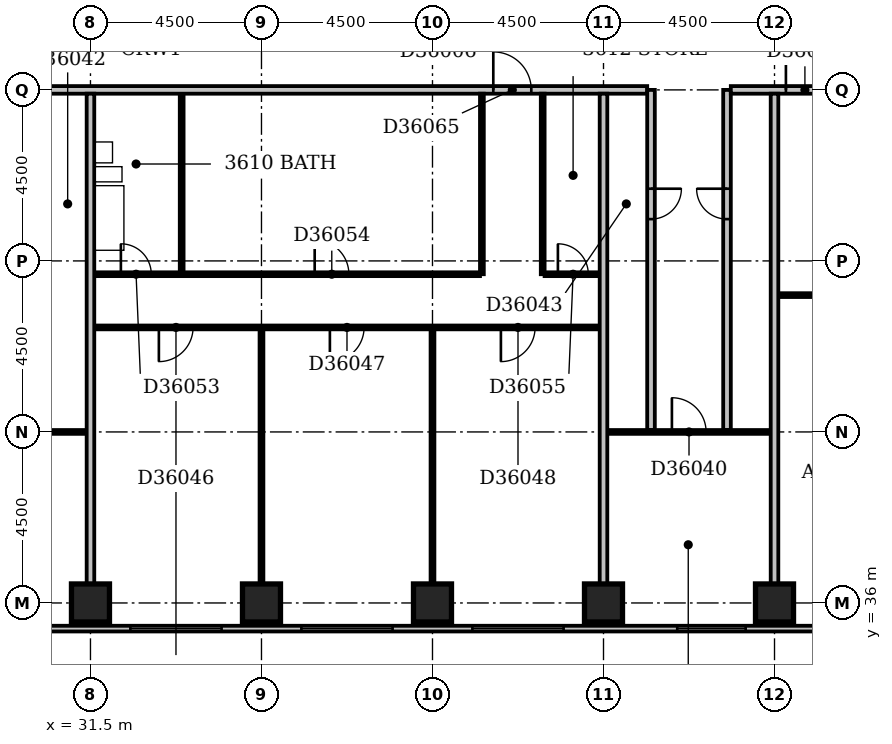
"""IFC4 building model, lengths in metres.
Left out: names, types, materials, properties, quantities, classifications, styles, units other than length and angle.
Written with IfcOpenShell. Run it as: python <this file> out.ifc"""

import sys

from ifc_helpers import new_model, si_unit, direction, frame, frame_2d, origin, origin_2d, place, context, subcontext, project, spatial, rectangle, extrude, element, fill, save


model = new_model("IFC4")
c1 = context("Model", 3, precision=1e-05, world=origin(), true_north=direction((0.0, 1.0)))
c2 = subcontext(c1, "Body", "Model", "MODEL_VIEW")
j1 = project(units=[si_unit("LENGTHUNIT", "METRE"), si_unit("PLANEANGLEUNIT", "RADIAN")], contexts=[c1])
p1 = place(None, origin())
s1 = spatial("IfcSite", under=j1, at=p1, CompositionType="ELEMENT")
p2 = place(p1, origin())
s2 = spatial("IfcBuilding", under=s1, at=p2, CompositionType="ELEMENT")
p3 = place(p2, frame((0.0, 0.0, 144.8)))
s3 = spatial("IfcBuildingStorey", under=s2, at=p3, CompositionType="ELEMENT", Elevation=144.8)
for number, where, z_axis, x_axis in (
    (1, (31.5, 36.0, -0.3), (0.0, 0.0, 1.0), (1.0, 0.0, 0.0)),
    (2, (36.0, 36.0, -0.3), (0.0, 0.0, 1.0), (1.0, 0.0, 0.0)),
    (3, (40.5, 36.0, -0.3), (0.0, 0.0, 1.0), (1.0, 0.0, 0.0)),
    (4, (45.0, 36.0, -0.3), (0.0, 0.0, 1.0), (1.0, 0.0, 0.0)),
    (5, (49.5, 36.0, -0.3), (0.0, 0.0, 1.0), (1.0, 0.0, 0.0)),
):
    element("IfcColumn", number, at=place(p3, frame(where, z_axis=z_axis, x_axis=x_axis)), inside=s3, PredefinedType="COLUMN", context=c2, shape_type="SweptSolid", body=[
        extrude(rectangle(XDim=1.0, YDim=1.0, at=origin_2d()), origin(), (0.0, 0.0, 1.0), 3.6),
    ])
p4 = place(p3, frame((23.1, 35.325, 0.0), z_axis=(0.0, 0.0, 1.0), x_axis=(1.0, 0.0, 0.0)))
e6 = element("IfcWall", 6, at=p4, inside=s3, PredefinedType="STANDARD", context=c2, shape_type="SweptSolid", body=[
    extrude(rectangle(XDim=45.15, YDim=0.15, at=frame_2d((22.575, 0.0))), origin(), (0.0, 0.0, 1.0), 2.7),
])
p5 = place(p4, frame((0.306, 0.0, 0.6)))
e7 = element("IfcOpeningElement", 7, at=p5, cuts=e6, PredefinedType="OPENING", context=c2, shape_type="SweptSolid", body=[
    extrude(rectangle(XDim=2.4, YDim=1.8, at=frame_2d((1.2, 0.9))), frame((0.0, 0.087, 0.0), z_axis=(0.0, -1.0, 0.0), x_axis=(1.0, 0.0, 0.0)), (0.0, 0.0, 1.0), 0.174),
])
p6 = place(p4, frame((4.95, 0.0, 0.6)))
e8 = element("IfcOpeningElement", 8, at=p6, cuts=e6, PredefinedType="OPENING", context=c2, shape_type="SweptSolid", body=[
    extrude(rectangle(XDim=2.4, YDim=1.8, at=frame_2d((1.2, 0.9))), frame((0.0, 0.087, 0.0), z_axis=(0.0, -1.0, 0.0), x_axis=(1.0, 0.0, 0.0)), (0.0, 0.0, 1.0), 0.174),
])
p7 = place(p4, frame((9.45, 0.0, 0.6)))
e9 = element("IfcOpeningElement", 9, at=p7, cuts=e6, PredefinedType="OPENING", context=c2, shape_type="SweptSolid", body=[
    extrude(rectangle(XDim=2.4, YDim=1.8, at=frame_2d((1.2, 0.9))), frame((0.0, 0.087, 0.0), z_axis=(0.0, -1.0, 0.0), x_axis=(1.0, 0.0, 0.0)), (0.0, 0.0, 1.0), 0.174),
])
p8 = place(p4, frame((13.95, 0.0, 0.6)))
e10 = element("IfcOpeningElement", 10, at=p8, cuts=e6, PredefinedType="OPENING", context=c2, shape_type="SweptSolid", body=[
    extrude(rectangle(XDim=2.4, YDim=1.8, at=frame_2d((1.2, 0.9))), frame((0.0, 0.087, 0.0), z_axis=(0.0, -1.0, 0.0), x_axis=(1.0, 0.0, 0.0)), (0.0, 0.0, 1.0), 0.174),
])
p9 = place(p4, frame((18.45, 0.0, 0.6)))
e11 = element("IfcOpeningElement", 11, at=p9, cuts=e6, PredefinedType="OPENING", context=c2, shape_type="SweptSolid", body=[
    extrude(rectangle(XDim=2.4, YDim=1.8, at=frame_2d((1.2, 0.9))), frame((0.0, 0.087, 0.0), z_axis=(0.0, -1.0, 0.0), x_axis=(1.0, 0.0, 0.0)), (0.0, 0.0, 1.0), 0.174),
])
p10 = place(p4, frame((23.84, 0.0, 0.6)))
e12 = element("IfcOpeningElement", 12, at=p10, cuts=e6, PredefinedType="OPENING", context=c2, shape_type="SweptSolid", body=[
    extrude(rectangle(XDim=1.8, YDim=1.8, at=frame_2d((0.9, 0.9))), frame((0.0, 0.087, 0.0), z_axis=(0.0, -1.0, 0.0), x_axis=(1.0, 0.0, 0.0)), (0.0, 0.0, 1.0), 0.174),
])
p11 = place(p4, frame((27.45, 0.0, 0.6)))
e13 = element("IfcOpeningElement", 13, at=p11, cuts=e6, PredefinedType="OPENING", context=c2, shape_type="SweptSolid", body=[
    extrude(rectangle(XDim=2.4, YDim=1.8, at=frame_2d((1.2, 0.9))), frame((0.0, 0.087, 0.0), z_axis=(0.0, -1.0, 0.0), x_axis=(1.0, 0.0, 0.0)), (0.0, 0.0, 1.0), 0.174),
])
p12 = place(p4, frame((32.27, 0.0, 0.6)))
e14 = element("IfcOpeningElement", 14, at=p12, cuts=e6, PredefinedType="OPENING", context=c2, shape_type="SweptSolid", body=[
    extrude(rectangle(XDim=2.4, YDim=1.8, at=frame_2d((1.2, 0.9))), frame((0.0, 0.087, 0.0), z_axis=(0.0, -1.0, 0.0), x_axis=(1.0, 0.0, 0.0)), (0.0, 0.0, 1.0), 0.174),
])
p13 = place(p4, frame((36.45, 0.0, 0.6)))
e15 = element("IfcOpeningElement", 15, at=p13, cuts=e6, PredefinedType="OPENING", context=c2, shape_type="SweptSolid", body=[
    extrude(rectangle(XDim=2.4, YDim=1.8, at=frame_2d((1.2, 0.9))), frame((0.0, 0.087, 0.0), z_axis=(0.0, -1.0, 0.0), x_axis=(1.0, 0.0, 0.0)), (0.0, 0.0, 1.0), 0.174),
])
p14 = place(p4, frame((40.95, 0.0, 0.6)))
e16 = element("IfcOpeningElement", 16, at=p14, cuts=e6, PredefinedType="OPENING", context=c2, shape_type="SweptSolid", body=[
    extrude(rectangle(XDim=2.4, YDim=1.8, at=frame_2d((1.2, 0.9))), frame((0.0, 0.087, 0.0), z_axis=(0.0, -1.0, 0.0), x_axis=(1.0, 0.0, 0.0)), (0.0, 0.0, 1.0), 0.174),
])
p15 = place(p3, frame((31.5, 36.5, 0.0), z_axis=(0.0, 0.0, 1.0), x_axis=(0.0, 1.0, 0.0)))
e17 = element("IfcWall", 17, at=p15, inside=s3, PredefinedType="PARTITIONING", context=c2, shape_type="SweptSolid", body=[
    extrude(rectangle(XDim=12.9, YDim=0.2, at=frame_2d((6.45, 0.0))), origin(), (0.0, 0.0, 1.0), 3.3),
])
p16 = place(p3, frame((36.0, 36.5, 0.0), z_axis=(0.0, 0.0, 1.0), x_axis=(0.0, 1.0, 0.0)))
e18 = element("IfcWall", 18, at=p16, inside=s3, PredefinedType="PARTITIONING", context=c2, shape_type="SweptSolid", body=[
    extrude(rectangle(XDim=6.7, YDim=0.1, at=frame_2d((3.35, 0.0))), origin(), (0.0, 0.0, 1.0), 2.4),
])
p17 = place(p3, frame((40.5, 36.5, 0.0), z_axis=(0.0, 0.0, 1.0), x_axis=(0.0, 1.0, 0.0)))
e19 = element("IfcWall", 19, at=p17, inside=s3, PredefinedType="PARTITIONING", context=c2, shape_type="SweptSolid", body=[
    extrude(rectangle(XDim=6.7, YDim=0.1, at=frame_2d((3.35, 0.0))), origin(), (0.0, 0.0, 1.0), 3.3),
])
p18 = place(p3, frame((45.0, 36.5, 0.0), z_axis=(0.0, 0.0, 1.0), x_axis=(0.0, 1.0, 0.0)))
e20 = element("IfcWall", 20, at=p18, inside=s3, PredefinedType="PARTITIONING", context=c2, shape_type="SweptSolid", body=[
    extrude(rectangle(XDim=12.9, YDim=0.2, at=frame_2d((6.45, 0.0))), origin(), (0.0, 0.0, 1.0), 2.6),
])
p19 = place(p3, frame((49.5, 36.5, 0.0), z_axis=(0.0, 0.0, 1.0), x_axis=(0.0, 1.0, 0.0)))
e21 = element("IfcWall", 21, at=p19, inside=s3, PredefinedType="PARTITIONING", context=c2, shape_type="SweptSolid", body=[
    extrude(rectangle(XDim=12.9, YDim=0.2, at=frame_2d((6.45, 0.0))), origin(), (0.0, 0.0, 1.0), 3.3),
])
p20 = place(p3, frame((27.1, 40.5, 0.0), z_axis=(0.0, 0.0, 1.0), x_axis=(1.0, 0.0, 0.0)))
e22 = element("IfcWall", 22, at=p20, inside=s3, PredefinedType="PARTITIONING", context=c2, shape_type="SweptSolid", body=[
    extrude(rectangle(XDim=4.3, YDim=0.1, at=frame_2d((2.15, 0.0))), origin(), (0.0, 0.0, 1.0), 3.3),
])
p21 = place(p20, frame((1.7, 0.0, 0.0)))
e23 = element("IfcOpeningElement", 23, at=p21, cuts=e22, PredefinedType="OPENING", context=c2, shape_type="SweptSolid", body=[
    extrude(rectangle(XDim=0.9, YDim=2.1, at=frame_2d((0.45, 1.05))), frame((0.0, 0.062, 0.0), z_axis=(0.0, -1.0, 0.0), x_axis=(1.0, 0.0, 0.0)), (0.0, 0.0, 1.0), 0.124),
])
p22 = place(p3, frame((45.1, 40.5, 0.0), z_axis=(0.0, 0.0, 1.0), x_axis=(1.0, 0.0, 0.0)))
e24 = element("IfcWall", 24, at=p22, inside=s3, PredefinedType="PARTITIONING", context=c2, shape_type="SweptSolid", body=[
    extrude(rectangle(XDim=4.3, YDim=0.1, at=frame_2d((2.15, 0.0))), origin(), (0.0, 0.0, 1.0), 3.3),
])
p23 = place(p22, frame((1.7, 0.0, 0.0)))
e25 = element("IfcOpeningElement", 25, at=p23, cuts=e24, PredefinedType="OPENING", context=c2, shape_type="SweptSolid", body=[
    extrude(rectangle(XDim=0.9, YDim=2.1, at=frame_2d((0.45, 1.05))), frame((0.0, 0.062, 0.0), z_axis=(0.0, -1.0, 0.0), x_axis=(1.0, 0.0, 0.0)), (0.0, 0.0, 1.0), 0.124),
])
p24 = place(p3, frame((46.25, 40.55, 0.0), z_axis=(0.0, 0.0, 1.0), x_axis=(0.0, 1.0, 0.0)))
e26 = element("IfcWall", 26, at=p24, inside=s3, PredefinedType="PARTITIONING", context=c2, shape_type="SweptSolid", body=[
    extrude(rectangle(XDim=8.95, YDim=0.2, at=frame_2d((4.475, 0.0))), origin(), (0.0, 0.0, 1.0), 3.3),
])
p25 = place(p24, frame((5.55, 0.0, 0.0)))
e27 = element("IfcOpeningElement", 27, at=p25, cuts=e26, PredefinedType="OPENING", context=c2, shape_type="SweptSolid", body=[
    extrude(rectangle(XDim=0.8, YDim=2.1, at=frame_2d((0.4, 1.05))), frame((0.0, 0.112, 0.0), z_axis=(0.0, -1.0, 0.0), x_axis=(1.0, 0.0, 0.0)), (0.0, 0.0, 1.0), 0.224),
])
p26 = place(p3, frame((48.25, 40.55, 0.0), z_axis=(0.0, 0.0, 1.0), x_axis=(0.0, 1.0, 0.0)))
e28 = element("IfcWall", 28, at=p26, inside=s3, PredefinedType="PARTITIONING", context=c2, shape_type="SweptSolid", body=[
    extrude(rectangle(XDim=8.95, YDim=0.2, at=frame_2d((4.475, 0.0))), origin(), (0.0, 0.0, 1.0), 3.3),
])
p27 = place(p26, frame((5.55, 0.0, 0.0)))
e29 = element("IfcOpeningElement", 29, at=p27, cuts=e28, PredefinedType="OPENING", context=c2, shape_type="SweptSolid", body=[
    extrude(rectangle(XDim=0.8, YDim=2.1, at=frame_2d((0.4, 1.05))), frame((0.0, 0.112, 0.0), z_axis=(0.0, -1.0, 0.0), x_axis=(1.0, 0.0, 0.0)), (0.0, 0.0, 1.0), 0.224),
])
p28 = place(p3, frame((31.6, 43.25, 0.0), z_axis=(0.0, 0.0, 1.0), x_axis=(1.0, 0.0, 0.0)))
e30 = element("IfcWall", 30, at=p28, inside=s3, PredefinedType="PARTITIONING", context=c2, shape_type="SweptSolid", body=[
    extrude(rectangle(XDim=13.3, YDim=0.1, at=frame_2d((6.65, 0.0))), origin(), (0.0, 0.0, 1.0), 3.3),
])
p29 = place(p28, frame((1.7, 0.0, 0.0)))
e31 = element("IfcOpeningElement", 31, at=p29, cuts=e30, PredefinedType="OPENING", context=c2, shape_type="SweptSolid", body=[
    extrude(rectangle(XDim=0.9, YDim=2.1, at=frame_2d((0.45, 1.05))), frame((0.0, 0.062, 0.0), z_axis=(0.0, -1.0, 0.0), x_axis=(1.0, 0.0, 0.0)), (0.0, 0.0, 1.0), 0.124),
])
p30 = place(p28, frame((6.2, 0.0, 0.0)))
e32 = element("IfcOpeningElement", 32, at=p30, cuts=e30, PredefinedType="OPENING", context=c2, shape_type="SweptSolid", body=[
    extrude(rectangle(XDim=0.9, YDim=2.1, at=frame_2d((0.45, 1.05))), frame((0.0, 0.062, 0.0), z_axis=(0.0, -1.0, 0.0), x_axis=(1.0, 0.0, 0.0)), (0.0, 0.0, 1.0), 0.124),
])
p31 = place(p28, frame((10.7, 0.0, 0.0)))
e33 = element("IfcOpeningElement", 33, at=p31, cuts=e30, PredefinedType="OPENING", context=c2, shape_type="SweptSolid", body=[
    extrude(rectangle(XDim=0.9, YDim=2.1, at=frame_2d((0.45, 1.05))), frame((0.0, 0.062, 0.0), z_axis=(0.0, -1.0, 0.0), x_axis=(1.0, 0.0, 0.0)), (0.0, 0.0, 1.0), 0.124),
])
p32 = place(p3, frame((49.6, 44.1, 0.0), z_axis=(0.0, 0.0, 1.0), x_axis=(1.0, 0.0, 0.0)))
e34 = element("IfcWall", 34, at=p32, inside=s3, PredefinedType="PARTITIONING", context=c2, shape_type="SweptSolid", body=[
    extrude(rectangle(XDim=18.5, YDim=0.1, at=frame_2d((9.25, 0.0))), origin(), (0.0, 0.0, 1.0), 3.3),
])
p33 = place(p32, frame((3.95, 0.0, 0.0)))
e35 = element("IfcOpeningElement", 35, at=p33, cuts=e34, PredefinedType="OPENING", context=c2, shape_type="SweptSolid", body=[
    extrude(rectangle(XDim=0.9, YDim=2.1, at=frame_2d((0.45, 1.05))), frame((0.0, 0.062, 0.0), z_axis=(0.0, -1.0, 0.0), x_axis=(1.0, 0.0, 0.0)), (0.0, 0.0, 1.0), 0.124),
])
p34 = place(p32, frame((10.7, 0.0, 0.0)))
e36 = element("IfcOpeningElement", 36, at=p34, cuts=e34, PredefinedType="OPENING", context=c2, shape_type="SweptSolid", body=[
    extrude(rectangle(XDim=0.9, YDim=2.1, at=frame_2d((0.45, 1.05))), frame((0.0, 0.062, 0.0), z_axis=(0.0, -1.0, 0.0), x_axis=(1.0, 0.0, 0.0)), (0.0, 0.0, 1.0), 0.124),
])
p35 = place(p32, frame((14.05, 0.0, 0.0)))
e37 = element("IfcOpeningElement", 37, at=p35, cuts=e34, PredefinedType="OPENING", context=c2, shape_type="SweptSolid", body=[
    extrude(rectangle(XDim=0.9, YDim=2.1, at=frame_2d((0.45, 1.05))), frame((0.0, 0.062, 0.0), z_axis=(0.0, -1.0, 0.0), x_axis=(1.0, 0.0, 0.0)), (0.0, 0.0, 1.0), 0.124),
])
p36 = place(p3, frame((31.6, 44.65, 0.0), z_axis=(0.0, 0.0, 1.0), x_axis=(1.0, 0.0, 0.0)))
e38 = element("IfcWall", 38, at=p36, inside=s3, PredefinedType="PARTITIONING", context=c2, shape_type="SweptSolid", body=[
    extrude(rectangle(XDim=10.15, YDim=0.1, at=frame_2d((5.075, 0.0))), origin(), (0.0, 0.0, 1.0), 3.3),
])
p37 = place(p36, frame((0.7, 0.0, 0.0)))
e39 = element("IfcOpeningElement", 39, at=p37, cuts=e38, PredefinedType="OPENING", context=c2, shape_type="SweptSolid", body=[
    extrude(rectangle(XDim=0.8, YDim=2.1, at=frame_2d((0.4, 1.05))), frame((0.0, 0.062, 0.0), z_axis=(0.0, -1.0, 0.0), x_axis=(1.0, 0.0, 0.0)), (0.0, 0.0, 1.0), 0.124),
])
p38 = place(p36, frame((5.8, 0.0, 0.0)))
e40 = element("IfcOpeningElement", 40, at=p38, cuts=e38, PredefinedType="OPENING", context=c2, shape_type="SweptSolid", body=[
    extrude(rectangle(XDim=0.9, YDim=2.1, at=frame_2d((0.45, 1.05))), frame((0.0, 0.062, 0.0), z_axis=(0.0, -1.0, 0.0), x_axis=(1.0, 0.0, 0.0)), (0.0, 0.0, 1.0), 0.124),
])
for number, where, z_axis, x_axis in (
    (41, (41.8, 44.65, 0.0), (0.0, 0.0, 1.0), (0.0, 1.0, 0.0)),
    (42, (43.4, 44.65, 0.0), (0.0, 0.0, 1.0), (0.0, 1.0, 0.0)),
):
    element("IfcWall", number, at=place(p3, frame(where, z_axis=z_axis, x_axis=x_axis)), inside=s3, PredefinedType="PARTITIONING", context=c2, shape_type="SweptSolid", body=[
        extrude(rectangle(XDim=4.75, YDim=0.1, at=frame_2d((2.375, 0.0))), origin(), (0.0, 0.0, 1.0), 3.3),
    ])
p39 = place(p3, frame((43.45, 44.65, 0.0), z_axis=(0.0, 0.0, 1.0), x_axis=(1.0, 0.0, 0.0)))
e43 = element("IfcWall", 43, at=p39, inside=s3, PredefinedType="PARTITIONING", context=c2, shape_type="SweptSolid", body=[
    extrude(rectangle(XDim=1.45, YDim=0.1, at=frame_2d((0.725, 0.0))), origin(), (0.0, 0.0, 1.0), 3.3),
])
p40 = place(p39, frame((0.35, 0.0, 0.0)))
e44 = element("IfcOpeningElement", 44, at=p40, cuts=e43, PredefinedType="OPENING", context=c2, shape_type="SweptSolid", body=[
    extrude(rectangle(XDim=0.8, YDim=2.1, at=frame_2d((0.4, 1.05))), frame((0.0, 0.062, 0.0), z_axis=(0.0, -1.0, 0.0), x_axis=(1.0, 0.0, 0.0)), (0.0, 0.0, 1.0), 0.124),
])
p41 = place(p3, frame((33.9, 44.7, 0.0), z_axis=(0.0, 0.0, 1.0), x_axis=(0.0, 1.0, 0.0)))
e45 = element("IfcWall", 45, at=p41, inside=s3, PredefinedType="PLUMBINGWALL", context=c2, shape_type="SweptSolid", body=[
    extrude(rectangle(XDim=4.7, YDim=0.1, at=frame_2d((2.35, 0.0))), origin(), (0.0, 0.0, 1.0), 3.3),
])
p42 = place(p3, frame((30.35, 49.5, 0.0), z_axis=(0.0, 0.0, 1.0), x_axis=(1.0, 0.0, 0.0)))
e46 = element("IfcWall", 46, at=p42, inside=s3, PredefinedType="PARTITIONING", context=c2, shape_type="SweptSolid", body=[
    extrude(rectangle(XDim=15.8, YDim=0.2, at=frame_2d((7.9, 0.0))), origin(), (0.0, 0.0, 1.0), 3.3),
])
p43 = place(p42, frame((11.75, 0.0, 0.0)))
e47 = element("IfcOpeningElement", 47, at=p43, cuts=e46, PredefinedType="OPENING", context=c2, shape_type="SweptSolid", body=[
    extrude(rectangle(XDim=1.0, YDim=2.1, at=frame_2d((0.5, 1.05))), frame((0.0, 0.112, 0.0), z_axis=(0.0, -1.0, 0.0), x_axis=(1.0, 0.0, 0.0)), (0.0, 0.0, 1.0), 0.224),
])
p44 = place(p3, frame((48.35, 49.5, 0.0), z_axis=(0.0, 0.0, 1.0), x_axis=(1.0, 0.0, 0.0)))
e48 = element("IfcWall", 48, at=p44, inside=s3, PredefinedType="PARTITIONING", context=c2, shape_type="SweptSolid", body=[
    extrude(rectangle(XDim=18.65, YDim=0.2, at=frame_2d((9.325, 0.0))), origin(), (0.0, 0.0, 1.0), 3.3),
])
p45 = place(p44, frame((1.45, 0.0, 0.0)))
e49 = element("IfcOpeningElement", 49, at=p45, cuts=e48, PredefinedType="OPENING", context=c2, shape_type="SweptSolid", body=[
    extrude(rectangle(XDim=1.0, YDim=2.1, at=frame_2d((0.5, 1.05))), frame((0.0, 0.112, 0.0), z_axis=(0.0, -1.0, 0.0), x_axis=(1.0, 0.0, 0.0)), (0.0, 0.0, 1.0), 0.224),
])
p46 = place(p7, origin())
e50 = element("IfcWindow", 50, at=p46, inside=s3, PartitioningType="SINGLE_PANEL", PredefinedType="WINDOW", context=c2, shape_type="SweptSolid", body=[
    extrude(rectangle(XDim=2.4, YDim=1.8, at=frame_2d((1.2, 0.9))), frame((0.0, 0.03, 0.0), z_axis=(0.0, -1.0, 0.0), x_axis=(1.0, 0.0, 0.0)), (0.0, 0.0, 1.0), 0.06),
])
fill(e9, e50)
p47 = place(p8, origin())
e51 = element("IfcWindow", 51, at=p47, inside=s3, PartitioningType="SINGLE_PANEL", PredefinedType="WINDOW", context=c2, shape_type="SweptSolid", body=[
    extrude(rectangle(XDim=2.4, YDim=1.8, at=frame_2d((1.2, 0.9))), frame((0.0, 0.03, 0.0), z_axis=(0.0, -1.0, 0.0), x_axis=(1.0, 0.0, 0.0)), (0.0, 0.0, 1.0), 0.06),
])
fill(e10, e51)
p48 = place(p9, origin())
e52 = element("IfcWindow", 52, at=p48, inside=s3, PartitioningType="SINGLE_PANEL", PredefinedType="WINDOW", context=c2, shape_type="SweptSolid", body=[
    extrude(rectangle(XDim=2.4, YDim=1.8, at=frame_2d((1.2, 0.9))), frame((0.0, 0.03, 0.0), z_axis=(0.0, -1.0, 0.0), x_axis=(1.0, 0.0, 0.0)), (0.0, 0.0, 1.0), 0.06),
])
fill(e11, e52)
p49 = place(p10, origin())
e53 = element("IfcWindow", 53, at=p49, inside=s3, PartitioningType="SINGLE_PANEL", PredefinedType="WINDOW", context=c2, shape_type="SweptSolid", body=[
    extrude(rectangle(XDim=1.8, YDim=1.8, at=frame_2d((0.9, 0.9))), frame((0.0, 0.03, 0.0), z_axis=(0.0, -1.0, 0.0), x_axis=(1.0, 0.0, 0.0)), (0.0, 0.0, 1.0), 0.06),
])
fill(e12, e53)
p50 = place(p23, origin())
e54 = element("IfcDoor", 54, at=p50, inside=s3, OperationType="SINGLE_SWING_LEFT", PredefinedType="DOOR", context=c2, shape_type="SweptSolid", body=[
    extrude(rectangle(XDim=0.9, YDim=2.1, at=frame_2d((0.45, 1.05))), frame((0.0, 0.025, 0.0), z_axis=(0.0, -1.0, 0.0), x_axis=(1.0, 0.0, 0.0)), (0.0, 0.0, 1.0), 0.05),
])
fill(e25, e54)
p51 = place(p25, origin())
e55 = element("IfcDoor", 55, at=p51, inside=s3, OperationType="SINGLE_SWING_RIGHT", PredefinedType="DOOR", context=c2, shape_type="SweptSolid", body=[
    extrude(rectangle(XDim=0.8, YDim=2.1, at=frame_2d((0.4, 1.05))), frame((0.0, 0.025, 0.0), z_axis=(0.0, -1.0, 0.0), x_axis=(1.0, 0.0, 0.0)), (0.0, 0.0, 1.0), 0.05),
])
fill(e27, e55)
p52 = place(p27, frame((0.8, 0.0, 0.0), z_axis=(0.0, 0.0, 1.0), x_axis=(-1.0, 0.0, 0.0)))
e56 = element("IfcDoor", 56, at=p52, inside=s3, OperationType="SINGLE_SWING_LEFT", PredefinedType="DOOR", context=c2, shape_type="SweptSolid", body=[
    extrude(rectangle(XDim=0.8, YDim=2.1, at=frame_2d((0.4, 1.05))), frame((0.0, 0.025, 0.0), z_axis=(0.0, -1.0, 0.0), x_axis=(1.0, 0.0, 0.0)), (0.0, 0.0, 1.0), 0.05),
])
fill(e29, e56)
p53 = place(p29, frame((0.9, 0.0, 0.0), z_axis=(0.0, 0.0, 1.0), x_axis=(-1.0, 0.0, 0.0)))
e57 = element("IfcDoor", 57, at=p53, inside=s3, OperationType="SINGLE_SWING_RIGHT", PredefinedType="DOOR", context=c2, shape_type="SweptSolid", body=[
    extrude(rectangle(XDim=0.9, YDim=2.1, at=frame_2d((0.45, 1.05))), frame((0.0, 0.025, 0.0), z_axis=(0.0, -1.0, 0.0), x_axis=(1.0, 0.0, 0.0)), (0.0, 0.0, 1.0), 0.05),
])
fill(e31, e57)
p54 = place(p30, frame((0.9, 0.0, 0.0), z_axis=(0.0, 0.0, 1.0), x_axis=(-1.0, 0.0, 0.0)))
e58 = element("IfcDoor", 58, at=p54, inside=s3, OperationType="SINGLE_SWING_RIGHT", PredefinedType="DOOR", context=c2, shape_type="SweptSolid", body=[
    extrude(rectangle(XDim=0.9, YDim=2.1, at=frame_2d((0.45, 1.05))), frame((0.0, 0.025, 0.0), z_axis=(0.0, -1.0, 0.0), x_axis=(1.0, 0.0, 0.0)), (0.0, 0.0, 1.0), 0.05),
])
fill(e32, e58)
p55 = place(p31, frame((0.9, 0.0, 0.0), z_axis=(0.0, 0.0, 1.0), x_axis=(-1.0, 0.0, 0.0)))
e59 = element("IfcDoor", 59, at=p55, inside=s3, OperationType="SINGLE_SWING_RIGHT", PredefinedType="DOOR", context=c2, shape_type="SweptSolid", body=[
    extrude(rectangle(XDim=0.9, YDim=2.1, at=frame_2d((0.45, 1.05))), frame((0.0, 0.025, 0.0), z_axis=(0.0, -1.0, 0.0), x_axis=(1.0, 0.0, 0.0)), (0.0, 0.0, 1.0), 0.05),
])
fill(e33, e59)
p56 = place(p37, origin())
e60 = element("IfcDoor", 60, at=p56, inside=s3, OperationType="SINGLE_SWING_LEFT", PredefinedType="DOOR", context=c2, shape_type="SweptSolid", body=[
    extrude(rectangle(XDim=0.8, YDim=2.1, at=frame_2d((0.4, 1.05))), frame((0.0, 0.025, 0.0), z_axis=(0.0, -1.0, 0.0), x_axis=(1.0, 0.0, 0.0)), (0.0, 0.0, 1.0), 0.05),
])
fill(e39, e60)
p57 = place(p38, origin())
e61 = element("IfcDoor", 61, at=p57, inside=s3, OperationType="SINGLE_SWING_LEFT", PredefinedType="DOOR", context=c2, shape_type="SweptSolid", body=[
    extrude(rectangle(XDim=0.9, YDim=2.1, at=frame_2d((0.45, 1.05))), frame((0.0, 0.025, 0.0), z_axis=(0.0, -1.0, 0.0), x_axis=(1.0, 0.0, 0.0)), (0.0, 0.0, 1.0), 0.05),
])
fill(e40, e61)
p58 = place(p40, origin())
e62 = element("IfcDoor", 62, at=p58, inside=s3, OperationType="SINGLE_SWING_LEFT", PredefinedType="DOOR", context=c2, shape_type="SweptSolid", body=[
    extrude(rectangle(XDim=0.8, YDim=2.1, at=frame_2d((0.4, 1.05))), frame((0.0, 0.025, 0.0), z_axis=(0.0, -1.0, 0.0), x_axis=(1.0, 0.0, 0.0)), (0.0, 0.0, 1.0), 0.05),
])
fill(e44, e62)
p59 = place(p43, origin())
e63 = element("IfcDoor", 63, at=p59, inside=s3, OperationType="SINGLE_SWING_LEFT", PredefinedType="DOOR", context=c2, shape_type="SweptSolid", body=[
    extrude(rectangle(XDim=1.0, YDim=2.1, at=frame_2d((0.5, 1.05))), frame((0.0, 0.025, 0.0), z_axis=(0.0, -1.0, 0.0), x_axis=(1.0, 0.0, 0.0)), (0.0, 0.0, 1.0), 0.05),
])
fill(e47, e63)
p60 = place(p45, origin())
e64 = element("IfcDoor", 64, at=p60, inside=s3, OperationType="SINGLE_SWING_LEFT", PredefinedType="DOOR", context=c2, shape_type="SweptSolid", body=[
    extrude(rectangle(XDim=1.0, YDim=2.1, at=frame_2d((0.5, 1.05))), frame((0.0, 0.025, 0.0), z_axis=(0.0, -1.0, 0.0), x_axis=(1.0, 0.0, 0.0)), (0.0, 0.0, 1.0), 0.05),
])
fill(e49, e64)
save(model, sys.argv[1])
